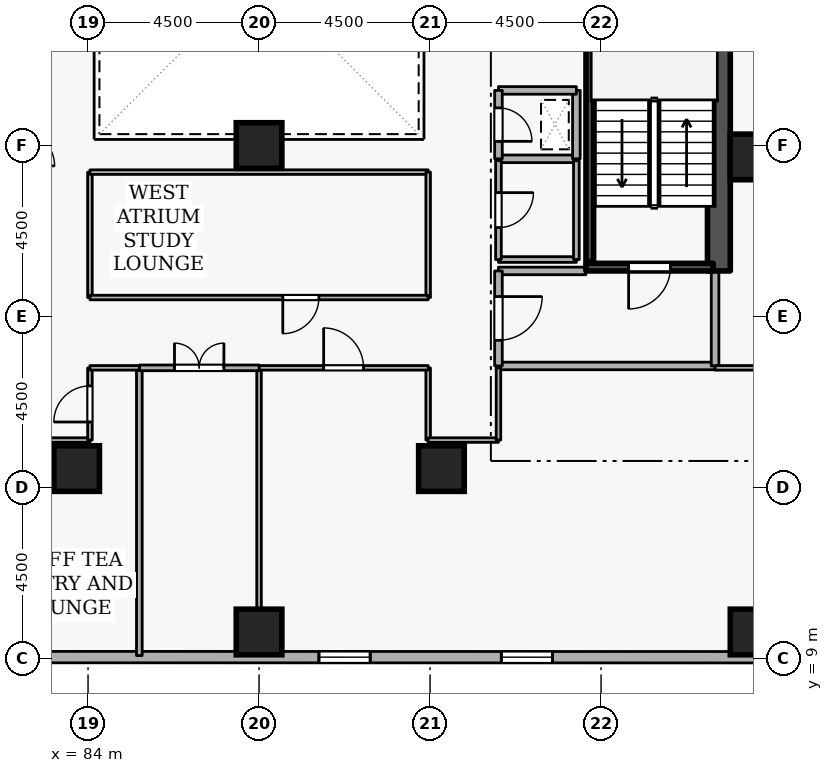
"""IFC4 building model, lengths in metres.
Left out: names, types, materials, properties, quantities, classifications, styles, units other than length and angle.
Written with IfcOpenShell. Run it as: python <this file> out.ifc"""

import sys

from ifc_helpers import new_model, si_unit, direction, frame, frame_2d, origin, origin_2d, place, context, subcontext, project, spatial, rectangle, extrude, element, fill, save


model = new_model("IFC4")
c1 = context("Model", 3, precision=1e-05, world=origin(), true_north=direction((0.0, 1.0)))
c2 = subcontext(c1, "Body", "Model", "MODEL_VIEW")
j1 = project(units=[si_unit("LENGTHUNIT", "METRE"), si_unit("PLANEANGLEUNIT", "RADIAN")], contexts=[c1])
p1 = place(None, origin())
s1 = spatial("IfcSite", under=j1, at=p1, CompositionType="ELEMENT")
p2 = place(p1, origin())
s2 = spatial("IfcBuilding", under=s1, at=p2, CompositionType="ELEMENT")
p3 = place(p2, frame((0.0, 0.0, 94.5)))
s3 = spatial("IfcBuildingStorey", under=s2, at=p3, CompositionType="ELEMENT", Elevation=94.5)
p4 = place(p3, frame((100.6, 19.2, 0.0), z_axis=(0.0, 0.0, 1.0), x_axis=(0.0, 1.0, 0.0)))
e1 = element("IfcWall", 1, at=p4, inside=s3, PredefinedType="SHEAR", context=c2, shape_type="SweptSolid", body=[
    extrude(rectangle(XDim=15.6, YDim=0.6, at=frame_2d((7.8, 0.0))), origin(), (0.0, 0.0, 1.0), 3.6),
])
for number, where, z_axis, x_axis in (
    (2, (101.5, 9.7, 0.0), (0.0, 0.0, 1.0), (1.0, 0.0, 0.0)),
    (3, (88.5, 9.7, 0.0), (0.0, 0.0, 1.0), (1.0, 0.0, 0.0)),
    (4, (93.3, 14.0, 0.0), (0.0, 0.0, 1.0), (1.0, 0.0, 0.0)),
    (5, (83.7, 14.0, 0.0), (0.0, 0.0, 1.0), (1.0, 0.0, 0.0)),
    (6, (101.5, 22.2, 0.0), (0.0, 0.0, 1.0), (1.0, 0.0, 0.0)),
    (7, (88.5, 22.5, 0.0), (0.0, 0.0, 1.0), (1.0, 0.0, 0.0)),
):
    element("IfcColumn", number, at=place(p3, frame(where, z_axis=z_axis, x_axis=x_axis)), inside=s3, PredefinedType="COLUMN", context=c2, shape_type="SweptSolid", body=[
        extrude(rectangle(XDim=1.2, YDim=1.2, at=origin_2d()), origin(), (0.0, 0.0, 1.0), 3.6),
    ])
p5 = place(p3, frame((69.075, 9.042, 0.0), z_axis=(0.0, 0.0, 1.0), x_axis=(0.999999983371, -0.000182370391, 0.0)))
e8 = element("IfcWall", 8, at=p5, inside=s3, PredefinedType="STANDARD", context=c2, shape_type="SweptSolid", body=[
    extrude(rectangle(XDim=34.806, YDim=0.3, at=frame_2d((17.403, 0.0))), origin(), (0.0, 0.0, 1.0), 2.22),
])
p6 = place(p5, frame((1.8, 0.0, 0.72)))
e9 = element("IfcOpeningElement", 9, at=p6, cuts=e8, PredefinedType="OPENING", context=c2, shape_type="SweptSolid", body=[
    extrude(rectangle(XDim=1.35, YDim=1.05, at=frame_2d((0.675, 0.525))), frame((0.0, 0.16, 0.0), z_axis=(0.0, -1.0, 0.0), x_axis=(1.0, 0.0, 0.0)), (0.0, 0.0, 1.0), 0.32),
])
p7 = place(p5, frame((11.4, 0.0, 0.72)))
e10 = element("IfcOpeningElement", 10, at=p7, cuts=e8, PredefinedType="OPENING", context=c2, shape_type="SweptSolid", body=[
    extrude(rectangle(XDim=1.35, YDim=1.05, at=frame_2d((0.675, 0.525))), frame((0.0, 0.16, 0.0), z_axis=(0.0, -1.0, 0.0), x_axis=(1.0, 0.0, 0.0)), (0.0, 0.0, 1.0), 0.32),
])
p8 = place(p5, frame((21.0, 0.0, 0.72)))
e11 = element("IfcOpeningElement", 11, at=p8, cuts=e8, PredefinedType="OPENING", context=c2, shape_type="SweptSolid", body=[
    extrude(rectangle(XDim=1.35, YDim=1.05, at=frame_2d((0.675, 0.525))), frame((0.0, 0.16, 0.0), z_axis=(0.0, -1.0, 0.0), x_axis=(1.0, 0.0, 0.0)), (0.0, 0.0, 1.0), 0.32),
])
p9 = place(p5, frame((25.8, 0.0, 0.72)))
e12 = element("IfcOpeningElement", 12, at=p9, cuts=e8, PredefinedType="OPENING", context=c2, shape_type="SweptSolid", body=[
    extrude(rectangle(XDim=1.35, YDim=1.05, at=frame_2d((0.675, 0.525))), frame((0.0, 0.16, 0.0), z_axis=(0.0, -1.0, 0.0), x_axis=(1.0, 0.0, 0.0)), (0.0, 0.0, 1.0), 0.32),
])
p10 = place(p3, frame((100.45, 19.3, 0.0), z_axis=(0.0, 0.0, 1.0), x_axis=(-1.0, 0.0, 0.0)))
e13 = element("IfcWall", 13, at=p10, inside=s3, PredefinedType="SHEAR", context=c2, shape_type="SweptSolid", body=[
    extrude(rectangle(XDim=3.35, YDim=0.2, at=frame_2d((1.675, 0.0))), origin(), (0.0, 0.0, 1.0), 3.6),
])
p11 = place(p10, frame((1.125, 0.0, 0.0)))
e14 = element("IfcOpeningElement", 14, at=p11, cuts=e13, PredefinedType="OPENING", context=c2, shape_type="SweptSolid", body=[
    extrude(rectangle(XDim=1.1, YDim=2.1, at=frame_2d((0.55, 1.05))), frame((0.0, 0.11, 0.0), z_axis=(0.0, -1.0, 0.0), x_axis=(1.0, 0.0, 0.0)), (0.0, 0.0, 1.0), 0.22),
])
p12 = place(p3, frame((97.203, 26.55, 0.0), z_axis=(0.0, 0.0, 1.0), x_axis=(0.0, -1.0, 0.0)))
e15 = element("IfcWall", 15, at=p12, inside=s3, PredefinedType="SHEAR", context=c2, shape_type="SweptSolid", body=[
    extrude(rectangle(XDim=7.1, YDim=0.2, at=frame_2d((3.55, 0.0))), origin(), (0.0, 0.0, 1.0), 3.6),
])
p13 = place(p3, frame((94.8, 16.7, 0.0), z_axis=(0.0, 0.0, 1.0), x_axis=(1.0, 0.0, 0.0)))
e16 = element("IfcWall", 16, at=p13, inside=s3, PredefinedType="STANDARD", context=c2, shape_type="SweptSolid", body=[
    extrude(rectangle(XDim=5.7, YDim=0.2, at=frame_2d((2.85, 0.0))), origin(), (0.0, 0.0, 1.0), 3.3),
])
p14 = place(p3, frame((100.5, 16.7, 0.0), z_axis=(0.0, 0.0, 1.0), x_axis=(0.0, 1.0, 0.0)))
e17 = element("IfcWall", 17, at=p14, inside=s3, PredefinedType="STANDARD", context=c2, shape_type="SweptSolid", body=[
    extrude(rectangle(XDim=2.5, YDim=0.2, at=frame_2d((1.25, 0.0))), origin(), (0.0, 0.0, 1.0), 3.3),
])
p15 = place(p3, frame((97.1, 19.2, 0.0), z_axis=(0.0, 0.0, 1.0), x_axis=(-1.0, 0.0, 0.0)))
e18 = element("IfcWall", 18, at=p15, inside=s3, PredefinedType="STANDARD", context=c2, shape_type="SweptSolid", body=[
    extrude(rectangle(XDim=2.3, YDim=0.2, at=frame_2d((1.15, 0.0))), origin(), (0.0, 0.0, 1.0), 2.505),
])
p16 = place(p3, frame((94.8, 19.2, 0.0), z_axis=(0.0, 0.0, 1.0), x_axis=(0.0, -1.0, 0.0)))
e19 = element("IfcWall", 19, at=p16, inside=s3, PredefinedType="STANDARD", context=c2, shape_type="SweptSolid", body=[
    extrude(rectangle(XDim=2.5, YDim=0.2, at=frame_2d((1.25, 0.0))), origin(), (0.0, 0.0, 1.0), 3.3),
])
p17 = place(p16, frame((0.675, 0.0, 0.0)))
e20 = element("IfcOpeningElement", 20, at=p17, cuts=e19, PredefinedType="OPENING", context=c2, shape_type="SweptSolid", body=[
    extrude(rectangle(XDim=1.15, YDim=2.1, at=frame_2d((0.575, 1.05))), frame((0.0, 0.11, 0.0), z_axis=(0.0, -1.0, 0.0), x_axis=(1.0, 0.0, 0.0)), (0.0, 0.0, 1.0), 0.22),
])
p18 = place(p3, frame((94.8, 22.15, 0.0), z_axis=(0.0, 0.0, 1.0), x_axis=(1.0, 0.0, 0.0)))
e21 = element("IfcWall", 21, at=p18, inside=s3, PredefinedType="STANDARD", context=c2, shape_type="SweptSolid", body=[
    extrude(rectangle(XDim=2.05, YDim=0.2, at=frame_2d((1.025, 0.0))), origin(), (0.0, 0.0, 1.0), 3.3),
])
p19 = place(p3, frame((96.85, 22.15, 0.0), z_axis=(0.0, 0.0, 1.0), x_axis=(0.0, 1.0, 0.0)))
e22 = element("IfcWall", 22, at=p19, inside=s3, PredefinedType="STANDARD", context=c2, shape_type="SweptSolid", body=[
    extrude(rectangle(XDim=1.8, YDim=0.2, at=frame_2d((0.9, 0.0))), origin(), (0.0, 0.0, 1.0), 3.3),
])
p20 = place(p3, frame((96.85, 23.95, 0.0), z_axis=(0.0, 0.0, 1.0), x_axis=(-1.0, 0.0, 0.0)))
e23 = element("IfcWall", 23, at=p20, inside=s3, PredefinedType="STANDARD", context=c2, shape_type="SweptSolid", body=[
    extrude(rectangle(XDim=2.05, YDim=0.2, at=frame_2d((1.025, 0.0))), origin(), (0.0, 0.0, 1.0), 3.3),
])
p21 = place(p3, frame((94.8, 23.95, 0.0), z_axis=(0.0, 0.0, 1.0), x_axis=(0.0, -1.0, 0.0)))
e24 = element("IfcWall", 24, at=p21, inside=s3, PredefinedType="STANDARD", context=c2, shape_type="SweptSolid", body=[
    extrude(rectangle(XDim=1.8, YDim=0.2, at=frame_2d((0.9, 0.0))), origin(), (0.0, 0.0, 1.0), 3.3),
])
p22 = place(p21, frame((0.46, 0.0, 0.0)))
e25 = element("IfcOpeningElement", 25, at=p22, cuts=e24, PredefinedType="OPENING", context=c2, shape_type="SweptSolid", body=[
    extrude(rectangle(XDim=0.88, YDim=2.04, at=frame_2d((0.44, 1.02))), frame((0.0, 0.11, 0.0), z_axis=(0.0, -1.0, 0.0), x_axis=(1.0, 0.0, 0.0)), (0.0, 0.0, 1.0), 0.22),
])
p23 = place(p3, frame((94.8, 19.5, 0.0), z_axis=(0.0, 0.0, 1.0), x_axis=(1.0, 0.0, 0.0)))
e26 = element("IfcWall", 26, at=p23, inside=s3, PredefinedType="PARTITIONING", context=c2, shape_type="SweptSolid", body=[
    extrude(rectangle(XDim=2.05, YDim=0.15, at=frame_2d((1.025, 0.0))), origin(), (0.0, 0.0, 1.0), 2.505),
])
p24 = place(p3, frame((96.85, 19.5, 0.0), z_axis=(0.0, 0.0, 1.0), x_axis=(0.0, 1.0, 0.0)))
e27 = element("IfcWall", 27, at=p24, inside=s3, PredefinedType="PARTITIONING", context=c2, shape_type="SweptSolid", body=[
    extrude(rectangle(XDim=2.6, YDim=0.15, at=frame_2d((1.3, 0.0))), origin(), (0.0, 0.0, 1.0), 3.3),
])
p25 = place(p3, frame((94.8, 22.1, 0.0), z_axis=(0.0, 0.0, 1.0), x_axis=(0.0, -1.0, 0.0)))
e28 = element("IfcWall", 28, at=p25, inside=s3, PredefinedType="PARTITIONING", context=c2, shape_type="SweptSolid", body=[
    extrude(rectangle(XDim=2.6, YDim=0.15, at=frame_2d((1.3, 0.0))), origin(), (0.0, 0.0, 1.0), 3.3),
])
p26 = place(p25, frame((0.84, 0.0, 0.0)))
e29 = element("IfcOpeningElement", 29, at=p26, cuts=e28, PredefinedType="OPENING", context=c2, shape_type="SweptSolid", body=[
    extrude(rectangle(XDim=0.92, YDim=2.08, at=frame_2d((0.46, 1.04))), frame((0.0, 0.085, 0.0), z_axis=(0.0, -1.0, 0.0), x_axis=(1.0, 0.0, 0.0)), (0.0, 0.0, 1.0), 0.17),
])
p27 = place(p3, frame((92.95, 16.65, 0.0), z_axis=(0.0, 0.0, 1.0), x_axis=(0.0, -1.0, 0.0)))
e30 = element("IfcWall", 30, at=p27, inside=s3, PredefinedType="PARTITIONING", context=c2, shape_type="SweptSolid", body=[
    extrude(rectangle(XDim=1.9, YDim=0.12, at=frame_2d((0.95, 0.0))), origin(), (0.0, 0.0, 1.0), 3.3),
])
p28 = place(p3, frame((92.95, 14.75, 0.0), z_axis=(0.0, 0.0, 1.0), x_axis=(1.0, 0.0, 0.0)))
e31 = element("IfcWall", 31, at=p28, inside=s3, PredefinedType="PARTITIONING", context=c2, shape_type="SweptSolid", body=[
    extrude(rectangle(XDim=1.85, YDim=0.12, at=frame_2d((0.925, 0.0))), origin(), (0.0, 0.0, 1.0), 3.3),
])
p29 = place(p3, frame((94.8, 14.75, 0.0), z_axis=(0.0, 0.0, 1.0), x_axis=(0.0, 1.0, 0.0)))
e32 = element("IfcWall", 32, at=p29, inside=s3, PredefinedType="PARTITIONING", context=c2, shape_type="SweptSolid", body=[
    extrude(rectangle(XDim=1.9, YDim=0.12, at=frame_2d((0.95, 0.0))), origin(), (0.0, 0.0, 1.0), 3.3),
])
p30 = place(p3, frame((100.5, 16.65, 0.0), z_axis=(0.0, 0.0, 1.0), x_axis=(1.0, 0.0, 0.0)))
e33 = element("IfcWall", 33, at=p30, inside=s3, PredefinedType="PARTITIONING", context=c2, shape_type="SweptSolid", body=[
    extrude(rectangle(XDim=5.92, YDim=0.12, at=frame_2d((2.96, 0.0))), origin(), (0.0, 0.0, 1.0), 3.3),
])
p31 = place(p3, frame((88.5, 9.08, 0.0), z_axis=(0.0, 0.0, 1.0), x_axis=(0.0, 1.0, 0.0)))
e34 = element("IfcWall", 34, at=p31, inside=s3, PredefinedType="PARTITIONING", context=c2, shape_type="SweptSolid", body=[
    extrude(rectangle(XDim=7.57, YDim=0.12, at=frame_2d((3.785, 0.0))), origin(), (0.0, 0.0, 1.0), 1.685),
])
p32 = place(p3, frame((88.5, 16.65, 0.0), z_axis=(0.0, 0.0, 1.0), x_axis=(1.0, 0.0, 0.0)))
e35 = element("IfcWall", 35, at=p32, inside=s3, PredefinedType="PARTITIONING", context=c2, shape_type="SweptSolid", body=[
    extrude(rectangle(XDim=4.45, YDim=0.12, at=frame_2d((2.225, 0.0))), origin(), (0.0, 0.0, 1.0), 3.3),
])
p33 = place(p32, frame((1.7, 0.0, 0.0)))
e36 = element("IfcOpeningElement", 36, at=p33, cuts=e35, PredefinedType="OPENING", context=c2, shape_type="SweptSolid", body=[
    extrude(rectangle(XDim=1.05, YDim=2.1, at=frame_2d((0.525, 1.05))), frame((0.0, 0.07, 0.0), z_axis=(0.0, -1.0, 0.0), x_axis=(1.0, 0.0, 0.0)), (0.0, 0.0, 1.0), 0.14),
])
p34 = place(p3, frame((85.35, 9.08, 0.0), z_axis=(0.0, 0.0, 1.0), x_axis=(0.0, 1.0, 0.0)))
e37 = element("IfcWall", 37, at=p34, inside=s3, PredefinedType="PARTITIONING", context=c2, shape_type="SweptSolid", body=[
    extrude(rectangle(XDim=7.57, YDim=0.15, at=frame_2d((3.785, 0.0))), origin(), (0.0, 0.0, 1.0), 3.3),
])
p35 = place(p3, frame((85.35, 16.65, 0.0), z_axis=(0.0, 0.0, 1.0), x_axis=(1.0, 0.0, 0.0)))
e38 = element("IfcWall", 38, at=p35, inside=s3, PredefinedType="PARTITIONING", context=c2, shape_type="SweptSolid", body=[
    extrude(rectangle(XDim=3.15, YDim=0.15, at=frame_2d((1.575, 0.0))), origin(), (0.0, 0.0, 1.0), 3.3),
])
p36 = place(p35, frame((0.925, 0.0, 0.0)))
e39 = element("IfcOpeningElement", 39, at=p36, cuts=e38, PredefinedType="OPENING", context=c2, shape_type="SweptSolid", body=[
    extrude(rectangle(XDim=1.3, YDim=2.12, at=frame_2d((0.65, 1.06))), frame((0.0, 0.085, 0.0), z_axis=(0.0, -1.0, 0.0), x_axis=(1.0, 0.0, 0.0)), (0.0, 0.0, 1.0), 0.17),
])
p37 = place(p3, frame((82.2, 14.75, 0.0), z_axis=(0.0, 0.0, 1.0), x_axis=(1.0, 0.0, 0.0)))
e40 = element("IfcWall", 40, at=p37, inside=s3, PredefinedType="PARTITIONING", context=c2, shape_type="SweptSolid", body=[
    extrude(rectangle(XDim=1.85, YDim=0.12, at=frame_2d((0.925, 0.0))), origin(), (0.0, 0.0, 1.0), 3.3),
])
p38 = place(p3, frame((84.05, 14.75, 0.0), z_axis=(0.0, 0.0, 1.0), x_axis=(0.0, 1.0, 0.0)))
e41 = element("IfcWall", 41, at=p38, inside=s3, PredefinedType="PARTITIONING", context=c2, shape_type="SweptSolid", body=[
    extrude(rectangle(XDim=1.9, YDim=0.12, at=frame_2d((0.95, 0.0))), origin(), (0.0, 0.0, 1.0), 3.3),
])
p39 = place(p38, frame((0.475, 0.0, 0.0)))
e42 = element("IfcOpeningElement", 42, at=p39, cuts=e41, PredefinedType="OPENING", context=c2, shape_type="SweptSolid", body=[
    extrude(rectangle(XDim=0.95, YDim=2.1, at=frame_2d((0.475, 1.05))), frame((0.0, 0.07, 0.0), z_axis=(0.0, -1.0, 0.0), x_axis=(1.0, 0.0, 0.0)), (0.0, 0.0, 1.0), 0.14),
])
p40 = place(p3, frame((84.05, 16.65, 0.0), z_axis=(0.0, 0.0, 1.0), x_axis=(1.0, 0.0, 0.0)))
e43 = element("IfcWall", 43, at=p40, inside=s3, PredefinedType="PARTITIONING", context=c2, shape_type="SweptSolid", body=[
    extrude(rectangle(XDim=1.3, YDim=0.12, at=frame_2d((0.65, 0.0))), origin(), (0.0, 0.0, 1.0), 3.3),
])
p41 = place(p3, frame((84.05, 18.5, 0.0), z_axis=(0.0, 0.0, 1.0), x_axis=(0.0, 1.0, 0.0)))
e44 = element("IfcWall", 44, at=p41, inside=s3, PredefinedType="PARTITIONING", context=c2, shape_type="SweptSolid", body=[
    extrude(rectangle(XDim=3.3, YDim=0.12, at=frame_2d((1.65, 0.0))), origin(), (0.0, 0.0, 1.0), 3.3),
])
p42 = place(p3, frame((84.05, 21.8, 0.0), z_axis=(0.0, 0.0, 1.0), x_axis=(1.0, 0.0, 0.0)))
e45 = element("IfcWall", 45, at=p42, inside=s3, PredefinedType="PARTITIONING", context=c2, shape_type="SweptSolid", body=[
    extrude(rectangle(XDim=8.9, YDim=0.12, at=frame_2d((4.45, 0.0))), origin(), (0.0, 0.0, 1.0), 3.3),
])
p43 = place(p3, frame((92.95, 21.8, 0.0), z_axis=(0.0, 0.0, 1.0), x_axis=(0.0, -1.0, 0.0)))
e46 = element("IfcWall", 46, at=p43, inside=s3, PredefinedType="PARTITIONING", context=c2, shape_type="SweptSolid", body=[
    extrude(rectangle(XDim=3.3, YDim=0.12, at=frame_2d((1.65, 0.0))), origin(), (0.0, 0.0, 1.0), 3.3),
])
p44 = place(p3, frame((92.95, 18.5, 0.0), z_axis=(0.0, 0.0, 1.0), x_axis=(-1.0, 0.0, 0.0)))
e47 = element("IfcWall", 47, at=p44, inside=s3, PredefinedType="PARTITIONING", context=c2, shape_type="SweptSolid", body=[
    extrude(rectangle(XDim=8.9, YDim=0.12, at=frame_2d((4.45, 0.0))), origin(), (0.0, 0.0, 1.0), 3.3),
])
p45 = place(p44, frame((2.875, 0.0, 0.0)))
e48 = element("IfcOpeningElement", 48, at=p45, cuts=e47, PredefinedType="OPENING", context=c2, shape_type="SweptSolid", body=[
    extrude(rectangle(XDim=0.95, YDim=2.1, at=frame_2d((0.475, 1.05))), frame((0.0, 0.07, 0.0), z_axis=(0.0, -1.0, 0.0), x_axis=(1.0, 0.0, 0.0)), (0.0, 0.0, 1.0), 0.14),
])
p46 = place(p8, origin())
e49 = element("IfcWindow", 49, at=p46, inside=s3, PartitioningType="SINGLE_PANEL", PredefinedType="WINDOW", context=c2, shape_type="SweptSolid", body=[
    extrude(rectangle(XDim=1.35, YDim=1.05, at=frame_2d((0.675, 0.525))), frame((0.0, 0.03, 0.0), z_axis=(0.0, -1.0, 0.0), x_axis=(1.0, 0.0, 0.0)), (0.0, 0.0, 1.0), 0.06),
])
fill(e11, e49)
p47 = place(p9, origin())
e50 = element("IfcWindow", 50, at=p47, inside=s3, PartitioningType="SINGLE_PANEL", PredefinedType="WINDOW", context=c2, shape_type="SweptSolid", body=[
    extrude(rectangle(XDim=1.35, YDim=1.05, at=frame_2d((0.675, 0.525))), frame((0.0, 0.03, 0.0), z_axis=(0.0, -1.0, 0.0), x_axis=(1.0, 0.0, 0.0)), (0.0, 0.0, 1.0), 0.06),
])
fill(e12, e50)
p48 = place(p11, origin())
e51 = element("IfcDoor", 51, at=p48, inside=s3, OperationType="SINGLE_SWING_RIGHT", PredefinedType="DOOR", context=c2, shape_type="SweptSolid", body=[
    extrude(rectangle(XDim=1.1, YDim=2.1, at=frame_2d((0.55, 1.05))), frame((0.0, 0.025, 0.0), z_axis=(0.0, -1.0, 0.0), x_axis=(1.0, 0.0, 0.0)), (0.0, 0.0, 1.0), 0.05),
])
fill(e14, e51)
p49 = place(p17, origin())
e52 = element("IfcDoor", 52, at=p49, inside=s3, OperationType="SINGLE_SWING_LEFT", PredefinedType="DOOR", context=c2, shape_type="SweptSolid", body=[
    extrude(rectangle(XDim=1.15, YDim=2.1, at=frame_2d((0.575, 1.05))), frame((0.0, 0.025, 0.0), z_axis=(0.0, -1.0, 0.0), x_axis=(1.0, 0.0, 0.0)), (0.0, 0.0, 1.0), 0.05),
])
fill(e20, e52)
p50 = place(p22, origin())
e53 = element("IfcDoor", 53, at=p50, inside=s3, OperationType="SINGLE_SWING_RIGHT", PredefinedType="DOOR", context=c2, shape_type="SweptSolid", body=[
    extrude(rectangle(XDim=0.88, YDim=2.04, at=frame_2d((0.44, 1.02))), frame((0.0, 0.025, 0.0), z_axis=(0.0, -1.0, 0.0), x_axis=(1.0, 0.0, 0.0)), (0.0, 0.0, 1.0), 0.05),
])
fill(e25, e53)
p51 = place(p26, origin())
e54 = element("IfcDoor", 54, at=p51, inside=s3, OperationType="SINGLE_SWING_LEFT", PredefinedType="DOOR", context=c2, shape_type="SweptSolid", body=[
    extrude(rectangle(XDim=0.92, YDim=2.08, at=frame_2d((0.46, 1.04))), frame((0.0, 0.025, 0.0), z_axis=(0.0, -1.0, 0.0), x_axis=(1.0, 0.0, 0.0)), (0.0, 0.0, 1.0), 0.05),
])
fill(e29, e54)
p52 = place(p33, origin())
e55 = element("IfcDoor", 55, at=p52, inside=s3, OperationType="SINGLE_SWING_LEFT", PredefinedType="DOOR", context=c2, shape_type="SweptSolid", body=[
    extrude(rectangle(XDim=1.05, YDim=2.1, at=frame_2d((0.525, 1.05))), frame((0.0, 0.025, 0.0), z_axis=(0.0, -1.0, 0.0), x_axis=(1.0, 0.0, 0.0)), (0.0, 0.0, 1.0), 0.05),
])
fill(e36, e55)
p53 = place(p36, origin())
e56 = element("IfcDoor", 56, at=p53, inside=s3, OperationType="DOUBLE_DOOR_SINGLE_SWING", PredefinedType="DOOR", context=c2, shape_type="SweptSolid", body=[
    extrude(rectangle(XDim=1.3, YDim=2.12, at=frame_2d((0.65, 1.06))), frame((0.0, 0.025, 0.0), z_axis=(0.0, -1.0, 0.0), x_axis=(1.0, 0.0, 0.0)), (0.0, 0.0, 1.0), 0.05),
])
fill(e39, e56)
p54 = place(p39, origin())
e57 = element("IfcDoor", 57, at=p54, inside=s3, OperationType="SINGLE_SWING_LEFT", PredefinedType="DOOR", context=c2, shape_type="SweptSolid", body=[
    extrude(rectangle(XDim=0.95, YDim=2.1, at=frame_2d((0.475, 1.05))), frame((0.0, 0.025, 0.0), z_axis=(0.0, -1.0, 0.0), x_axis=(1.0, 0.0, 0.0)), (0.0, 0.0, 1.0), 0.05),
])
fill(e42, e57)
p55 = place(p45, origin())
e58 = element("IfcDoor", 58, at=p55, inside=s3, OperationType="SINGLE_SWING_RIGHT", PredefinedType="DOOR", context=c2, shape_type="SweptSolid", body=[
    extrude(rectangle(XDim=0.95, YDim=2.1, at=frame_2d((0.475, 1.05))), frame((0.0, 0.025, 0.0), z_axis=(0.0, -1.0, 0.0), x_axis=(1.0, 0.0, 0.0)), (0.0, 0.0, 1.0), 0.05),
])
fill(e48, e58)
save(model, sys.argv[1])
